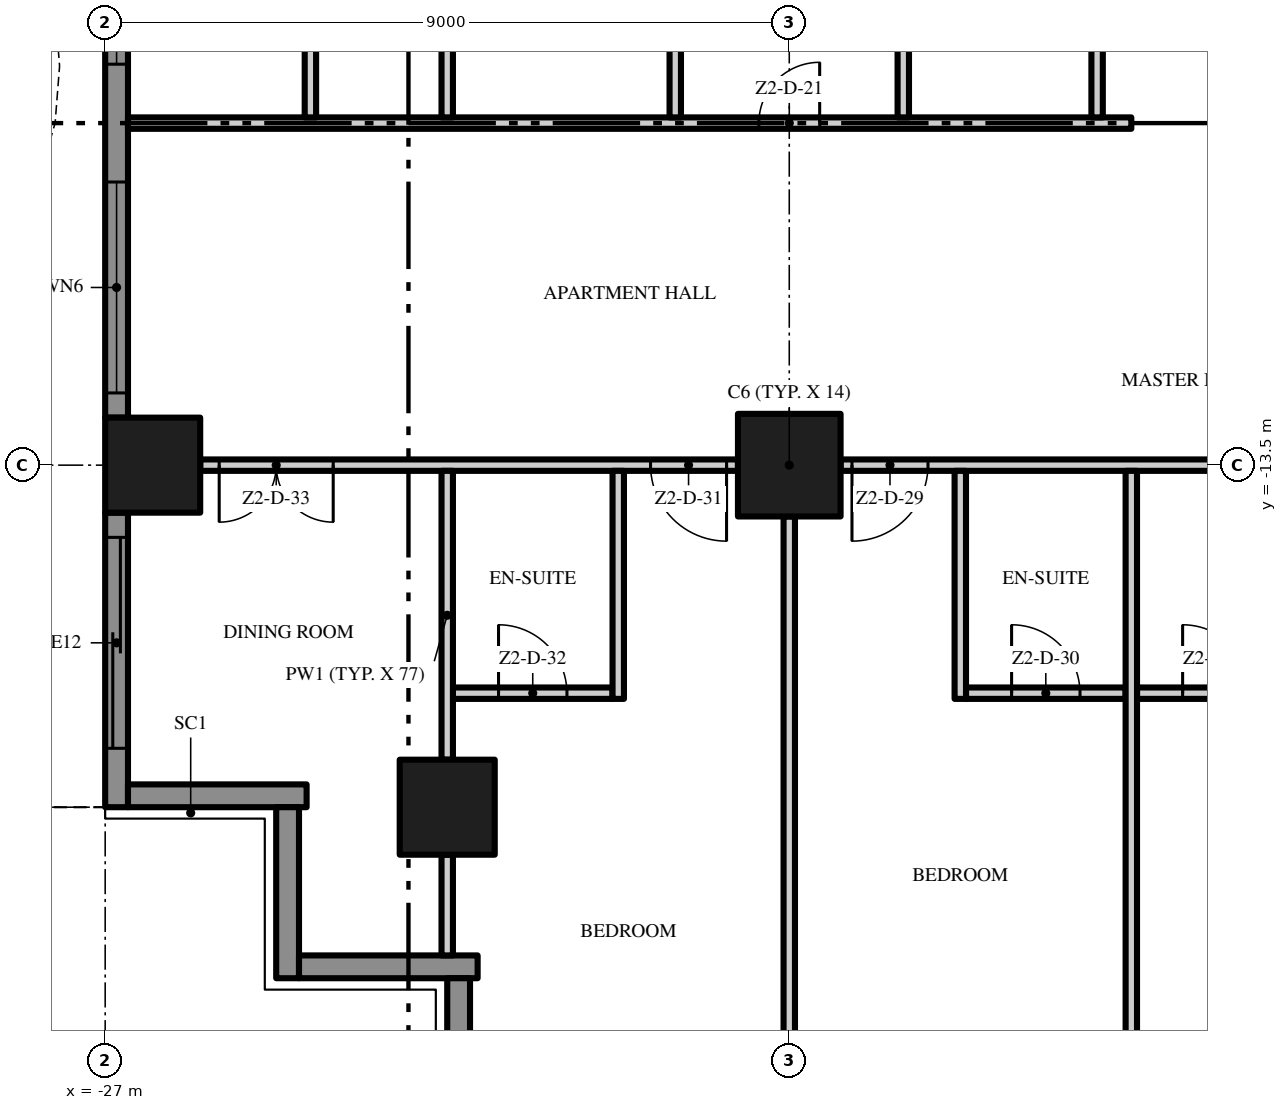
"""IFC4 building model, lengths in metres.
Left out: names, types, materials, properties, quantities, classifications, styles, units other than length and angle.
Written with IfcOpenShell. Run it as: python <this file> out.ifc"""

import sys

from ifc_helpers import new_model, si_unit, direction, frame, frame_2d, origin, origin_2d, place, context, subcontext, project, spatial, polyline, rectangle, outline, extrude, element, fill, save


model = new_model("IFC4")
c1 = context("Model", 3, precision=1e-05, world=origin(), true_north=direction((0.0, 1.0)))
c2 = subcontext(c1, "Body", "Model", "MODEL_VIEW")
j1 = project(units=[si_unit("LENGTHUNIT", "METRE"), si_unit("PLANEANGLEUNIT", "RADIAN")], contexts=[c1])
p1 = place(None, origin())
s1 = spatial("IfcSite", under=j1, at=p1, CompositionType="ELEMENT")
p2 = place(p1, origin())
s2 = spatial("IfcBuilding", under=s1, at=p2, CompositionType="ELEMENT")
p3 = place(p2, frame((0.0, 0.0, 107.4)))
s3 = spatial("IfcBuildingStorey", under=s2, at=p3, CompositionType="ELEMENT", Elevation=107.4)
p4 = place(p3, frame((-18.0, -13.5, 0.0), z_axis=(0.0, 0.0, 1.0), x_axis=(1.0, 0.0, 0.0)))
e1 = element("IfcColumn", 1, at=p4, inside=s3, PredefinedType="COLUMN", context=c2, shape_type="SweptSolid", body=[
    extrude(rectangle(XDim=1.35, YDim=1.35, at=origin_2d()), origin(), (0.0, 0.0, 1.0), 3.5),
])
for number, where, z_axis, x_axis in (
    (2, (-26.375, -13.5, 0.0), (0.0, 0.0, 1.0), (1.0, 0.0, 0.0)),
    (3, (-22.5, -18.0, 0.0), (0.0, 0.0, 1.0), (1.0, 0.0, 0.0)),
):
    element("IfcColumn", number, at=place(p3, frame(where, z_axis=z_axis, x_axis=x_axis)), inside=s3, PredefinedType="COLUMN", context=c2, shape_type="SweptSolid", body=[
        extrude(rectangle(XDim=1.25, YDim=1.25, at=origin_2d()), origin(), (0.0, 0.0, 1.0), 3.5),
    ])
p5 = place(p3, frame((-26.85, -12.875, 0.0), z_axis=(0.0, 0.0, 1.0), x_axis=(0.0, 1.0, 0.0)))
e4 = element("IfcWall", 4, at=p5, inside=s3, PredefinedType="SOLIDWALL", context=c2, shape_type="SweptSolid", body=[
    extrude(rectangle(XDim=7.75, YDim=0.3, at=frame_2d((3.875, 0.0))), origin(), (0.0, 0.0, 1.0), 3.5),
])
p6 = place(p5, frame((4.65, 0.0, 0.45)))
e5 = element("IfcOpeningElement", 5, at=p6, cuts=e4, PredefinedType="OPENING", context=c2, shape_type="SweptSolid", body=[
    extrude(rectangle(XDim=2.775, YDim=2.65, at=frame_2d((1.387, 1.325))), frame((0.0, 0.16, 0.0), z_axis=(0.0, -1.0, 0.0), x_axis=(1.0, 0.0, 0.0)), (0.0, 0.0, 1.0), 0.32),
])
p7 = place(p5, frame((0.325, 0.0, 0.45)))
e6 = element("IfcOpeningElement", 6, at=p7, cuts=e4, PredefinedType="OPENING", context=c2, shape_type="SweptSolid", body=[
    extrude(rectangle(XDim=2.775, YDim=2.65, at=frame_2d((1.387, 1.325))), frame((0.0, 0.16, 0.0), z_axis=(0.0, -1.0, 0.0), x_axis=(1.0, 0.0, 0.0)), (0.0, 0.0, 1.0), 0.32),
])
p8 = place(p3, frame((-26.85, -18.0, 0.0), z_axis=(0.0, 0.0, 1.0), x_axis=(0.0, 1.0, 0.0)))
e7 = element("IfcWall", 7, at=p8, inside=s3, PredefinedType="SOLIDWALL", context=c2, shape_type="SweptSolid", body=[
    extrude(rectangle(XDim=3.875, YDim=0.3, at=frame_2d((1.938, 0.0))), origin(), (0.0, 0.0, 1.0), 3.5),
])
p9 = place(p8, frame((0.775, 0.0, 0.0)))
e8 = element("IfcOpeningElement", 8, at=p9, cuts=e7, PredefinedType="OPENING", context=c2, shape_type="SweptSolid", body=[
    extrude(rectangle(XDim=2.775, YDim=2.4, at=frame_2d((1.387, 1.2))), frame((0.0, 0.16, 0.0), z_axis=(0.0, -1.0, 0.0), x_axis=(1.0, 0.0, 0.0)), (0.0, 0.0, 1.0), 0.32),
])
p10 = place(p3, frame((-24.35, -17.85, 0.0), z_axis=(0.0, 0.0, 1.0), x_axis=(-1.0, 0.0, 0.0)))
e9 = element("IfcWall", 9, at=p10, inside=s3, PredefinedType="SOLIDWALL", context=c2, shape_type="SweptSolid", body=[
    extrude(rectangle(XDim=2.35, YDim=0.3, at=frame_2d((1.175, 0.0))), origin(), (0.0, 0.0, 1.0), 3.5),
])
p11 = place(p3, frame((-24.6, -20.25, 0.0), z_axis=(0.0, 0.0, 1.0), x_axis=(0.0, 1.0, 0.0)))
e10 = element("IfcWall", 10, at=p11, inside=s3, PredefinedType="SOLIDWALL", context=c2, shape_type="SweptSolid", body=[
    extrude(rectangle(XDim=2.25, YDim=0.3, at=frame_2d((1.125, 0.0))), origin(), (0.0, 0.0, 1.0), 3.5),
])
p12 = place(p3, frame((-22.1, -20.1, 0.0), z_axis=(0.0, 0.0, 1.0), x_axis=(-1.0, 0.0, 0.0)))
e11 = element("IfcWall", 11, at=p12, inside=s3, PredefinedType="SOLIDWALL", context=c2, shape_type="SweptSolid", body=[
    extrude(rectangle(XDim=2.35, YDim=0.3, at=frame_2d((1.175, 0.0))), origin(), (0.0, 0.0, 1.0), 3.5),
])
p13 = place(p3, frame((-22.35, -22.5, 0.0), z_axis=(0.0, 0.0, 1.0), x_axis=(0.0, 1.0, 0.0)))
e12 = element("IfcWall", 12, at=p13, inside=s3, PredefinedType="SOLIDWALL", context=c2, shape_type="SweptSolid", body=[
    extrude(rectangle(XDim=2.25, YDim=0.3, at=frame_2d((1.125, 0.0))), origin(), (0.0, 0.0, 1.0), 3.5),
])
p14 = place(p3, origin())
e13 = element("IfcWall", 13, at=p14, inside=s3, PredefinedType="USERDEFINED", context=c2, shape_type="SweptSolid", body=[
    extrude(outline(polyline([(-28.8, 18.0), (-29.505, 16.5), (-29.941, 15.0), (-30.0, 14.25), (-29.941, 13.5), (-29.505, 12.0), (-28.8, 10.5), (-28.095, 9.0), (-27.659, 7.5), (-27.6, 6.75), (-27.659, 6.0), (-28.095, 4.5), (-28.8, 3.0), (-29.505, 1.5), (-29.941, 0.0), (-30.0, -0.75), (-29.941, -1.5), (-29.505, -3.0), (-28.8, -4.5), (-28.095, -6.0), (-27.659, -7.5), (-27.6, -8.25), (-27.659, -9.0), (-28.095, -10.5), (-28.8, -12.0), (-29.505, -13.5), (-29.941, -15.0), (-30.0, -15.75), (-29.941, -16.5), (-29.505, -18.0), (-29.265, -17.93), (-29.694, -16.455), (-29.749, -15.75), (-29.694, -15.045), (-29.271, -13.589), (-28.574, -12.106), (-27.86, -10.589), (-27.411, -9.045), (-27.349, -8.25), (-27.411, -7.455), (-27.86, -5.911), (-28.574, -4.394), (-29.271, -2.911), (-29.694, -1.455), (-29.749, -0.75), (-29.694, -0.045), (-29.271, 1.411), (-28.574, 2.894), (-27.86, 4.411), (-27.411, 5.955), (-27.349, 6.75), (-27.411, 7.545), (-27.86, 9.089), (-28.574, 10.606), (-29.271, 12.089), (-29.694, 13.545), (-29.749, 14.25), (-29.694, 14.955), (-29.271, 16.411), (-28.574, 17.894), (-28.8, 18.0)])), origin(), (0.0, 0.0, 1.0), 0.9),
])
p15 = place(p3, frame((-22.425, -16.5, 0.0), z_axis=(0.0, 0.0, 1.0), x_axis=(1.0, 0.0, 0.0)))
e14 = element("IfcWall", 14, at=p15, inside=s3, PredefinedType="PARTITIONING", context=c2, shape_type="SweptSolid", body=[
    extrude(rectangle(XDim=2.1, YDim=0.15, at=frame_2d((1.05, 0.0))), origin(), (0.0, 0.0, 1.0), 3.5),
])
p16 = place(p15, frame((0.6, 0.0, 0.0)))
e15 = element("IfcOpeningElement", 15, at=p16, cuts=e14, PredefinedType="OPENING", context=c2, shape_type="SweptSolid", body=[
    extrude(rectangle(XDim=0.9, YDim=2.1, at=frame_2d((0.45, 1.05))), frame((0.0, 0.085, 0.0), z_axis=(0.0, -1.0, 0.0), x_axis=(1.0, 0.0, 0.0)), (0.0, 0.0, 1.0), 0.17),
])
p17 = place(p3, frame((-15.675, -16.5, 0.0), z_axis=(0.0, 0.0, 1.0), x_axis=(1.0, 0.0, 0.0)))
e16 = element("IfcWall", 16, at=p17, inside=s3, PredefinedType="PARTITIONING", context=c2, shape_type="SweptSolid", body=[
    extrude(rectangle(XDim=2.1, YDim=0.15, at=frame_2d((1.05, 0.0))), origin(), (0.0, 0.0, 1.0), 3.5),
])
p18 = place(p17, frame((0.6, 0.0, 0.0)))
e17 = element("IfcOpeningElement", 17, at=p18, cuts=e16, PredefinedType="OPENING", context=c2, shape_type="SweptSolid", body=[
    extrude(rectangle(XDim=0.9, YDim=2.1, at=frame_2d((0.45, 1.05))), frame((0.0, 0.085, 0.0), z_axis=(0.0, -1.0, 0.0), x_axis=(1.0, 0.0, 0.0)), (0.0, 0.0, 1.0), 0.17),
])
p19 = place(p3, frame((-13.425, -16.5, 0.0), z_axis=(0.0, 0.0, 1.0), x_axis=(1.0, 0.0, 0.0)))
e18 = element("IfcWall", 18, at=p19, inside=s3, PredefinedType="PARTITIONING", context=c2, shape_type="SweptSolid", body=[
    extrude(rectangle(XDim=2.1, YDim=0.15, at=frame_2d((1.05, 0.0))), origin(), (0.0, 0.0, 1.0), 3.5),
])
p20 = place(p19, frame((0.6, 0.0, 0.0)))
e19 = element("IfcOpeningElement", 19, at=p20, cuts=e18, PredefinedType="OPENING", context=c2, shape_type="SweptSolid", body=[
    extrude(rectangle(XDim=0.9, YDim=2.1, at=frame_2d((0.45, 1.05))), frame((0.0, 0.085, 0.0), z_axis=(0.0, -1.0, 0.0), x_axis=(1.0, 0.0, 0.0)), (0.0, 0.0, 1.0), 0.17),
])
p21 = place(p3, frame((-18.675, -13.5, 0.0), z_axis=(0.0, 0.0, 1.0), x_axis=(-1.0, 0.0, 0.0)))
e20 = element("IfcWall", 20, at=p21, inside=s3, PredefinedType="PARTITIONING", context=c2, shape_type="SweptSolid", body=[
    extrude(rectangle(XDim=7.075, YDim=0.15, at=frame_2d((3.538, 0.0))), origin(), (0.0, 0.0, 1.0), 3.5),
])
p22 = place(p21, frame((0.15, 0.0, 0.0)))
e21 = element("IfcOpeningElement", 21, at=p22, cuts=e20, PredefinedType="OPENING", context=c2, shape_type="SweptSolid", body=[
    extrude(rectangle(XDim=1.0, YDim=2.4, at=frame_2d((0.5, 1.2))), frame((0.0, 0.085, 0.0), z_axis=(0.0, -1.0, 0.0), x_axis=(1.0, 0.0, 0.0)), (0.0, 0.0, 1.0), 0.17),
])
p23 = place(p21, frame((5.325, 0.0, 0.0)))
e22 = element("IfcOpeningElement", 22, at=p23, cuts=e20, PredefinedType="OPENING", context=c2, shape_type="SweptSolid", body=[
    extrude(rectangle(XDim=1.5, YDim=2.4, at=frame_2d((0.75, 1.2))), frame((0.0, 0.085, 0.0), z_axis=(0.0, -1.0, 0.0), x_axis=(1.0, 0.0, 0.0)), (0.0, 0.0, 1.0), 0.17),
])
p24 = place(p3, frame((-9.675, -13.5, 0.0), z_axis=(0.0, 0.0, 1.0), x_axis=(-1.0, 0.0, 0.0)))
e23 = element("IfcWall", 23, at=p24, inside=s3, PredefinedType="PARTITIONING", context=c2, shape_type="SweptSolid", body=[
    extrude(rectangle(XDim=7.65, YDim=0.15, at=frame_2d((3.825, 0.0))), origin(), (0.0, 0.0, 1.0), 3.5),
])
p25 = place(p24, frame((0.15, 0.0, 0.0)))
e24 = element("IfcOpeningElement", 24, at=p25, cuts=e23, PredefinedType="OPENING", context=c2, shape_type="SweptSolid", body=[
    extrude(rectangle(XDim=1.0, YDim=2.4, at=frame_2d((0.5, 1.2))), frame((0.0, 0.085, 0.0), z_axis=(0.0, -1.0, 0.0), x_axis=(1.0, 0.0, 0.0)), (0.0, 0.0, 1.0), 0.17),
])
p26 = place(p24, frame((6.5, 0.0, 0.0)))
e25 = element("IfcOpeningElement", 25, at=p26, cuts=e23, PredefinedType="OPENING", context=c2, shape_type="SweptSolid", body=[
    extrude(rectangle(XDim=1.0, YDim=2.4, at=frame_2d((0.5, 1.2))), frame((0.0, 0.085, 0.0), z_axis=(0.0, -1.0, 0.0), x_axis=(1.0, 0.0, 0.0)), (0.0, 0.0, 1.0), 0.17),
])
p27 = place(p3, frame((-26.7, -9.0, 0.0), z_axis=(0.0, 0.0, 1.0), x_axis=(1.0, 0.0, 0.0)))
e26 = element("IfcWall", 26, at=p27, inside=s3, PredefinedType="PARTITIONING", context=c2, shape_type="SweptSolid", body=[
    extrude(rectangle(XDim=13.2, YDim=0.15, at=frame_2d((6.6, 0.0))), origin(), (0.0, 0.0, 1.0), 3.5),
])
p28 = place(p27, frame((8.3, 0.0, 0.0)))
e27 = element("IfcOpeningElement", 27, at=p28, cuts=e26, PredefinedType="OPENING", context=c2, shape_type="SweptSolid", body=[
    extrude(rectangle(XDim=0.8, YDim=2.0, at=frame_2d((0.4, 1.0))), frame((0.0, 0.085, 0.0), z_axis=(0.0, -1.0, 0.0), x_axis=(1.0, 0.0, 0.0)), (0.0, 0.0, 1.0), 0.17),
])
p29 = place(p3, frame((-24.3, -8.925, 0.0), z_axis=(0.0, 0.0, 1.0), x_axis=(0.0, 1.0, 0.0)))
e28 = element("IfcWall", 28, at=p29, inside=s3, PredefinedType="PARTITIONING", context=c2, shape_type="SweptSolid", body=[
    extrude(rectangle(XDim=4.35, YDim=0.15, at=frame_2d((2.175, 0.0))), origin(), (0.0, 0.0, 1.0), 3.5),
])
p30 = place(p3, frame((-22.5, -19.95, 0.0), z_axis=(0.0, 0.0, 1.0), x_axis=(0.0, 1.0, 0.0)))
e29 = element("IfcWall", 29, at=p30, inside=s3, PredefinedType="PARTITIONING", context=c2, shape_type="SweptSolid", body=[
    extrude(rectangle(XDim=1.325, YDim=0.15, at=frame_2d((0.662, 0.0))), origin(), (0.0, 0.0, 1.0), 3.5),
])
p31 = place(p3, frame((-22.5, -17.375, 0.0), z_axis=(0.0, 0.0, 1.0), x_axis=(0.0, 1.0, 0.0)))
e30 = element("IfcWall", 30, at=p31, inside=s3, PredefinedType="PARTITIONING", context=c2, shape_type="SweptSolid", body=[
    extrude(rectangle(XDim=3.8, YDim=0.15, at=frame_2d((1.9, 0.0))), origin(), (0.0, 0.0, 1.0), 3.5),
])
p32 = place(p3, frame((-22.5, -8.925, 0.0), z_axis=(0.0, 0.0, 1.0), x_axis=(0.0, 1.0, 0.0)))
e31 = element("IfcWall", 31, at=p32, inside=s3, PredefinedType="PARTITIONING", context=c2, shape_type="SweptSolid", body=[
    extrude(rectangle(XDim=4.35, YDim=0.15, at=frame_2d((2.175, 0.0))), origin(), (0.0, 0.0, 1.0), 3.5),
])
p33 = place(p3, frame((-20.25, -16.575, 0.0), z_axis=(0.0, 0.0, 1.0), x_axis=(0.0, 1.0, 0.0)))
e32 = element("IfcWall", 32, at=p33, inside=s3, PredefinedType="PARTITIONING", context=c2, shape_type="SweptSolid", body=[
    extrude(rectangle(XDim=3.0, YDim=0.15, at=frame_2d((1.5, 0.0))), origin(), (0.0, 0.0, 1.0), 3.5),
])
p34 = place(p3, frame((-19.5, -8.925, 0.0), z_axis=(0.0, 0.0, 1.0), x_axis=(0.0, 1.0, 0.0)))
e33 = element("IfcWall", 33, at=p34, inside=s3, PredefinedType="PARTITIONING", context=c2, shape_type="SweptSolid", body=[
    extrude(rectangle(XDim=4.35, YDim=0.15, at=frame_2d((2.175, 0.0))), origin(), (0.0, 0.0, 1.0), 3.5),
])
p35 = place(p3, frame((-18.0, -21.25, 0.0), z_axis=(0.0, 0.0, 1.0), x_axis=(0.0, 1.0, 0.0)))
e34 = element("IfcWall", 34, at=p35, inside=s3, PredefinedType="PARTITIONING", context=c2, shape_type="SweptSolid", body=[
    extrude(rectangle(XDim=7.075, YDim=0.15, at=frame_2d((3.538, 0.0))), origin(), (0.0, 0.0, 1.0), 3.5),
])
p36 = place(p3, frame((-16.5, -8.925, 0.0), z_axis=(0.0, 0.0, 1.0), x_axis=(0.0, 1.0, 0.0)))
e35 = element("IfcWall", 35, at=p36, inside=s3, PredefinedType="PARTITIONING", context=c2, shape_type="SweptSolid", body=[
    extrude(rectangle(XDim=4.35, YDim=0.15, at=frame_2d((2.175, 0.0))), origin(), (0.0, 0.0, 1.0), 3.5),
])
p37 = place(p3, frame((-15.75, -16.575, 0.0), z_axis=(0.0, 0.0, 1.0), x_axis=(0.0, 1.0, 0.0)))
e36 = element("IfcWall", 36, at=p37, inside=s3, PredefinedType="PARTITIONING", context=c2, shape_type="SweptSolid", body=[
    extrude(rectangle(XDim=3.0, YDim=0.15, at=frame_2d((1.5, 0.0))), origin(), (0.0, 0.0, 1.0), 3.5),
])
p38 = place(p3, frame((-13.95, -8.925, 0.0), z_axis=(0.0, 0.0, 1.0), x_axis=(0.0, 1.0, 0.0)))
e37 = element("IfcWall", 37, at=p38, inside=s3, PredefinedType="PARTITIONING", context=c2, shape_type="SweptSolid", body=[
    extrude(rectangle(XDim=4.5, YDim=0.15, at=frame_2d((2.25, 0.0))), origin(), (0.0, 0.0, 1.0), 3.5),
])
p39 = place(p3, frame((-13.5, -22.2, 0.0), z_axis=(0.0, 0.0, 1.0), x_axis=(0.0, 1.0, 0.0)))
e38 = element("IfcWall", 38, at=p39, inside=s3, PredefinedType="PARTITIONING", context=c2, shape_type="SweptSolid", body=[
    extrude(rectangle(XDim=8.625, YDim=0.15, at=frame_2d((4.312, 0.0))), origin(), (0.0, 0.0, 1.0), 3.5),
])
p40 = place(p6, origin())
e39 = element("IfcWindow", 39, at=p40, inside=s3, PartitioningType="SINGLE_PANEL", PredefinedType="WINDOW", context=c2, shape_type="SweptSolid", body=[
    extrude(rectangle(XDim=2.775, YDim=2.65, at=frame_2d((1.387, 1.325))), frame((0.0, 0.03, 0.0), z_axis=(0.0, -1.0, 0.0), x_axis=(1.0, 0.0, 0.0)), (0.0, 0.0, 1.0), 0.06),
])
fill(e5, e39)
p41 = place(p7, origin())
e40 = element("IfcWindow", 40, at=p41, inside=s3, PartitioningType="SINGLE_PANEL", PredefinedType="WINDOW", context=c2, shape_type="SweptSolid", body=[
    extrude(rectangle(XDim=2.775, YDim=2.65, at=frame_2d((1.387, 1.325))), frame((0.0, 0.03, 0.0), z_axis=(0.0, -1.0, 0.0), x_axis=(1.0, 0.0, 0.0)), (0.0, 0.0, 1.0), 0.06),
])
fill(e6, e40)
p42 = place(p9, origin())
e41 = element("IfcDoor", 41, at=p42, inside=s3, OperationType="SINGLE_SWING_LEFT", PredefinedType="DOOR", context=c2, shape_type="SweptSolid", body=[
    extrude(rectangle(XDim=2.775, YDim=2.4, at=frame_2d((1.387, 1.2))), frame((0.0, 0.025, 0.0), z_axis=(0.0, -1.0, 0.0), x_axis=(1.0, 0.0, 0.0)), (0.0, 0.0, 1.0), 0.05),
])
fill(e8, e41)
p43 = place(p28, origin())
e42 = element("IfcDoor", 42, at=p43, inside=s3, OperationType="SINGLE_SWING_RIGHT", PredefinedType="DOOR", context=c2, shape_type="SweptSolid", body=[
    extrude(rectangle(XDim=0.8, YDim=2.0, at=frame_2d((0.4, 1.0))), frame((0.0, 0.025, 0.0), z_axis=(0.0, -1.0, 0.0), x_axis=(1.0, 0.0, 0.0)), (0.0, 0.0, 1.0), 0.05),
])
fill(e27, e42)
p44 = place(p20, origin())
e43 = element("IfcDoor", 43, at=p44, inside=s3, OperationType="SINGLE_SWING_LEFT", PredefinedType="DOOR", context=c2, shape_type="SweptSolid", body=[
    extrude(rectangle(XDim=0.9, YDim=2.1, at=frame_2d((0.45, 1.05))), frame((0.0, 0.025, 0.0), z_axis=(0.0, -1.0, 0.0), x_axis=(1.0, 0.0, 0.0)), (0.0, 0.0, 1.0), 0.05),
])
fill(e19, e43)
p45 = place(p26, origin())
e44 = element("IfcDoor", 44, at=p45, inside=s3, OperationType="SINGLE_SWING_RIGHT", PredefinedType="DOOR", context=c2, shape_type="SweptSolid", body=[
    extrude(rectangle(XDim=1.0, YDim=2.4, at=frame_2d((0.5, 1.2))), frame((0.0, 0.025, 0.0), z_axis=(0.0, -1.0, 0.0), x_axis=(1.0, 0.0, 0.0)), (0.0, 0.0, 1.0), 0.05),
])
fill(e25, e44)
p46 = place(p18, origin())
e45 = element("IfcDoor", 45, at=p46, inside=s3, OperationType="SINGLE_SWING_LEFT", PredefinedType="DOOR", context=c2, shape_type="SweptSolid", body=[
    extrude(rectangle(XDim=0.9, YDim=2.1, at=frame_2d((0.45, 1.05))), frame((0.0, 0.025, 0.0), z_axis=(0.0, -1.0, 0.0), x_axis=(1.0, 0.0, 0.0)), (0.0, 0.0, 1.0), 0.05),
])
fill(e17, e45)
p47 = place(p22, origin())
e46 = element("IfcDoor", 46, at=p47, inside=s3, OperationType="SINGLE_SWING_LEFT", PredefinedType="DOOR", context=c2, shape_type="SweptSolid", body=[
    extrude(rectangle(XDim=1.0, YDim=2.4, at=frame_2d((0.5, 1.2))), frame((0.0, 0.025, 0.0), z_axis=(0.0, -1.0, 0.0), x_axis=(1.0, 0.0, 0.0)), (0.0, 0.0, 1.0), 0.05),
])
fill(e21, e46)
p48 = place(p16, origin())
e47 = element("IfcDoor", 47, at=p48, inside=s3, OperationType="SINGLE_SWING_LEFT", PredefinedType="DOOR", context=c2, shape_type="SweptSolid", body=[
    extrude(rectangle(XDim=0.9, YDim=2.1, at=frame_2d((0.45, 1.05))), frame((0.0, 0.025, 0.0), z_axis=(0.0, -1.0, 0.0), x_axis=(1.0, 0.0, 0.0)), (0.0, 0.0, 1.0), 0.05),
])
fill(e15, e47)
p49 = place(p23, origin())
e48 = element("IfcDoor", 48, at=p49, inside=s3, OperationType="DOUBLE_DOOR_SINGLE_SWING", PredefinedType="DOOR", context=c2, shape_type="SweptSolid", body=[
    extrude(rectangle(XDim=1.5, YDim=2.4, at=frame_2d((0.75, 1.2))), frame((0.0, 0.025, 0.0), z_axis=(0.0, -1.0, 0.0), x_axis=(1.0, 0.0, 0.0)), (0.0, 0.0, 1.0), 0.05),
])
fill(e22, e48)
save(model, sys.argv[1])
